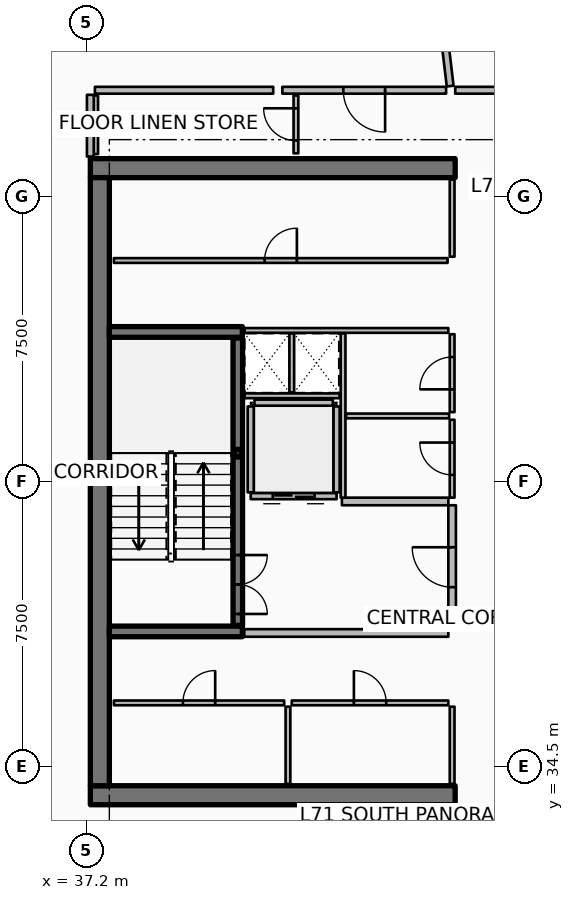
"""IFC4 building model, lengths in metres.
Left out: names, types, materials, properties, quantities, classifications, styles, units other than length and angle.
Written with IfcOpenShell. Run it as: python <this file> out.ifc"""

import sys

from ifc_helpers import new_model, si_unit, direction, frame, frame_2d, origin, origin_2d, place, context, subcontext, project, spatial, rectangle, hollow_rectangle, extrude, element, fill, save


model = new_model("IFC4")
c1 = context("Model", 3, precision=1e-05, world=origin(), true_north=direction((0.0, 1.0)))
c2 = subcontext(c1, "Body", "Model", "MODEL_VIEW")
j1 = project(units=[si_unit("LENGTHUNIT", "METRE"), si_unit("PLANEANGLEUNIT", "RADIAN")], contexts=[c1])
p1 = place(None, origin())
s1 = spatial("IfcSite", under=j1, at=p1, CompositionType="ELEMENT")
p2 = place(p1, origin())
s2 = spatial("IfcBuilding", under=s1, at=p2, CompositionType="ELEMENT")
p3 = place(p2, frame((0.0, 0.0, 282.9)))
s3 = spatial("IfcBuildingStorey", under=s2, at=p3, CompositionType="ELEMENT", Elevation=282.9)
for number, where, z_axis, x_axis in (
    (1, (37.3, 33.75, 0.0), (0.0, 0.0, 1.0), (1.0, 0.0, 0.0)),
    (2, (37.3, 50.25, 0.0), (0.0, 0.0, 1.0), (1.0, 0.0, 0.0)),
):
    element("IfcWall", number, at=place(p3, frame(where, z_axis=z_axis, x_axis=x_axis)), inside=s3, PredefinedType="SHEAR", context=c2, shape_type="SweptSolid", body=[
        extrude(rectangle(XDim=9.6, YDim=0.5, at=frame_2d((4.8, 0.0))), origin(), (0.0, 0.0, 1.0), 3.85),
    ])
p4 = place(p3, frame((37.55, 34.0, 0.0), z_axis=(0.0, 0.0, 1.0), x_axis=(0.0, 1.0, 0.0)))
e3 = element("IfcWall", 3, at=p4, inside=s3, PredefinedType="SHEAR", context=c2, shape_type="SweptSolid", body=[
    extrude(rectangle(XDim=16.0, YDim=0.5, at=frame_2d((8.0, 0.0))), origin(), (0.0, 0.0, 1.0), 3.85),
])
for number, where, z_axis, x_axis in (
    (4, (37.8, 38.06, 0.0), (0.0, 0.0, 1.0), (1.0, 0.0, 0.0)),
    (5, (37.8, 45.94, 0.0), (0.0, 0.0, 1.0), (1.0, 0.0, 0.0)),
):
    element("IfcWall", number, at=place(p3, frame(where, z_axis=z_axis, x_axis=x_axis)), inside=s3, PredefinedType="SHEAR", context=c2, shape_type="SweptSolid", body=[
        extrude(rectangle(XDim=3.5, YDim=0.28, at=frame_2d((1.75, 0.0))), origin(), (0.0, 0.0, 1.0), 3.85),
    ])
p5 = place(p3, frame((41.18, 42.75, 0.0), z_axis=(0.0, 0.0, 1.0), x_axis=(1.0, 0.0, 0.0)))
e6 = element("IfcColumn", 6, at=p5, inside=s3, PredefinedType="COLUMN", context=c2, shape_type="SweptSolid", body=[
    extrude(hollow_rectangle(XDim=0.2, YDim=0.2, WallThickness=0.01, InnerFilletRadius=0.01, OuterFilletRadius=0.02, at=origin_2d()), origin(), (0.0, 0.0, 1.0), 1.72),
])
p6 = place(p3, frame((41.18, 38.22, 0.0), z_axis=(0.0, 0.0, 1.0), x_axis=(0.0, 1.0, 0.0)))
e7 = element("IfcWall", 7, at=p6, inside=s3, PredefinedType="SOLIDWALL", context=c2, shape_type="SweptSolid", body=[
    extrude(rectangle(XDim=7.56, YDim=0.25, at=frame_2d((3.78, 0.0))), origin(), (0.0, 0.0, 1.0), 3.59),
])
p7 = place(p6, frame((0.3, 0.0, 0.0)))
e8 = element("IfcOpeningElement", 8, at=p7, cuts=e7, PredefinedType="OPENING", context=c2, shape_type="SweptSolid", body=[
    extrude(rectangle(XDim=1.55, YDim=2.15, at=frame_2d((0.775, 1.075))), frame((0.0, 0.135, 0.0), z_axis=(0.0, -1.0, 0.0), x_axis=(1.0, 0.0, 0.0)), (0.0, 0.0, 1.0), 0.27),
])
p8 = place(p3, frame((43.78, 41.62, 0.0), z_axis=(0.0, 0.0, 1.0), x_axis=(-1.0, 0.0, 0.0)))
e9 = element("IfcWall", 9, at=p8, inside=s3, PredefinedType="PARTITIONING", context=c2, shape_type="SweptSolid", body=[
    extrude(rectangle(XDim=2.26, YDim=0.16, at=frame_2d((1.13, 0.0))), origin(), (0.0, 0.0, 1.0), 3.59),
])
p9 = place(p8, frame((0.58, 0.0, 0.0)))
e10 = element("IfcOpeningElement", 10, at=p9, cuts=e9, PredefinedType="OPENING", context=c2, shape_type="SweptSolid", body=[
    extrude(rectangle(XDim=1.1, YDim=2.1, at=frame_2d((0.55, 1.05))), frame((0.0, 0.09, 0.0), z_axis=(0.0, -1.0, 0.0), x_axis=(1.0, 0.0, 0.0)), (0.0, 0.0, 1.0), 0.18),
])
for number, where, z_axis, x_axis in (
    (11, (43.78, 41.72, 0.0), (0.0, 0.0, 1.0), (0.0, 1.0, 0.0)),
    (12, (41.52, 41.72, 0.0), (0.0, 0.0, 1.0), (0.0, 1.0, 0.0)),
):
    element("IfcWall", number, at=place(p3, frame(where, z_axis=z_axis, x_axis=x_axis)), inside=s3, PredefinedType="PARTITIONING", context=c2, shape_type="SweptSolid", body=[
        extrude(rectangle(XDim=2.26, YDim=0.16, at=frame_2d((1.13, 0.0))), origin(), (0.0, 0.0, 1.0), 3.59),
    ])
p10 = place(p3, frame((41.62, 44.08, 0.0), z_axis=(0.0, 0.0, 1.0), x_axis=(1.0, 0.0, 0.0)))
e13 = element("IfcWall", 13, at=p10, inside=s3, PredefinedType="PARTITIONING", context=c2, shape_type="SweptSolid", body=[
    extrude(rectangle(XDim=2.06, YDim=0.16, at=frame_2d((1.03, 0.0))), origin(), (0.0, 0.0, 1.0), 3.59),
])
for number, where, z_axis, x_axis in (
    (14, (46.82, 34.05, 0.0), (0.0, 0.0, 1.0), (0.0, 1.0, 0.0)),
    (15, (42.5, 34.05, 0.0), (0.0, 0.0, 1.0), (0.0, 1.0, 0.0)),
):
    element("IfcWall", number, at=place(p3, frame(where, z_axis=z_axis, x_axis=x_axis)), inside=s3, PredefinedType="PARTITIONING", context=c2, shape_type="SweptSolid", body=[
        extrude(rectangle(XDim=2.03, YDim=0.125, at=frame_2d((1.015, 0.0))), origin(), (0.0, 0.0, 1.0), 3.03),
    ])
p11 = place(p3, frame((37.92, 36.18, 0.0), z_axis=(0.0, 0.0, 1.0), x_axis=(1.0, 0.0, 0.0)))
e16 = element("IfcWall", 16, at=p11, inside=s3, PredefinedType="PARTITIONING", context=c2, shape_type="SweptSolid", body=[
    extrude(rectangle(XDim=4.48, YDim=0.125, at=frame_2d((2.24, 0.0))), origin(), (0.0, 0.0, 1.0), 3.03),
])
p12 = place(p11, frame((1.815, 0.0, 0.0)))
e17 = element("IfcOpeningElement", 17, at=p12, cuts=e16, PredefinedType="OPENING", context=c2, shape_type="SweptSolid", body=[
    extrude(rectangle(XDim=0.85, YDim=2.06, at=frame_2d((0.425, 1.03))), frame((0.0, 0.073, 0.0), z_axis=(0.0, -1.0, 0.0), x_axis=(1.0, 0.0, 0.0)), (0.0, 0.0, 1.0), 0.145),
])
p13 = place(p3, frame((42.6, 36.18, 0.0), z_axis=(0.0, 0.0, 1.0), x_axis=(1.0, 0.0, 0.0)))
e18 = element("IfcWall", 18, at=p13, inside=s3, PredefinedType="PARTITIONING", context=c2, shape_type="SweptSolid", body=[
    extrude(rectangle(XDim=4.12, YDim=0.125, at=frame_2d((2.06, 0.0))), origin(), (0.0, 0.0, 1.0), 3.03),
])
p14 = place(p13, frame((1.635, 0.0, 0.0)))
e19 = element("IfcOpeningElement", 19, at=p14, cuts=e18, PredefinedType="OPENING", context=c2, shape_type="SweptSolid", body=[
    extrude(rectangle(XDim=0.85, YDim=2.06, at=frame_2d((0.425, 1.03))), frame((0.0, 0.073, 0.0), z_axis=(0.0, -1.0, 0.0), x_axis=(1.0, 0.0, 0.0)), (0.0, 0.0, 1.0), 0.145),
])
p15 = place(p3, frame((46.82, 47.92, 0.0), z_axis=(0.0, 0.0, 1.0), x_axis=(0.0, 1.0, 0.0)))
e20 = element("IfcWall", 20, at=p15, inside=s3, PredefinedType="PARTITIONING", context=c2, shape_type="SweptSolid", body=[
    extrude(rectangle(XDim=2.03, YDim=0.125, at=frame_2d((1.015, 0.0))), origin(), (0.0, 0.0, 1.0), 3.03),
])
p16 = place(p3, frame((37.92, 47.82, 0.0), z_axis=(0.0, 0.0, 1.0), x_axis=(1.0, 0.0, 0.0)))
e21 = element("IfcWall", 21, at=p16, inside=s3, PredefinedType="PARTITIONING", context=c2, shape_type="SweptSolid", body=[
    extrude(rectangle(XDim=8.78, YDim=0.125, at=frame_2d((4.39, 0.0))), origin(), (0.0, 0.0, 1.0), 3.03),
])
p17 = place(p16, frame((3.965, 0.0, 0.0)))
e22 = element("IfcOpeningElement", 22, at=p17, cuts=e21, PredefinedType="OPENING", context=c2, shape_type="SweptSolid", body=[
    extrude(rectangle(XDim=0.85, YDim=2.06, at=frame_2d((0.425, 1.03))), frame((0.0, 0.073, 0.0), z_axis=(0.0, -1.0, 0.0), x_axis=(1.0, 0.0, 0.0)), (0.0, 0.0, 1.0), 0.145),
])
p18 = place(p3, frame((41.35, 38.02, 0.0), z_axis=(0.0, 0.0, 1.0), x_axis=(1.0, 0.0, 0.0)))
e23 = element("IfcWall", 23, at=p18, inside=s3, PredefinedType="PARTITIONING", context=c2, shape_type="SweptSolid", body=[
    extrude(rectangle(XDim=5.37, YDim=0.2, at=frame_2d((2.685, 0.0))), origin(), (0.0, 0.0, 1.0), 3.59),
])
p19 = place(p3, frame((43.92, 41.48, 0.0), z_axis=(0.0, 0.0, 1.0), x_axis=(1.0, 0.0, 0.0)))
e24 = element("IfcWall", 24, at=p19, inside=s3, PredefinedType="PARTITIONING", context=c2, shape_type="SweptSolid", body=[
    extrude(rectangle(XDim=2.8, YDim=0.2, at=frame_2d((1.4, 0.0))), origin(), (0.0, 0.0, 1.0), 3.59),
])
p20 = place(p3, frame((46.82, 38.12, 0.0), z_axis=(0.0, 0.0, 1.0), x_axis=(0.0, 1.0, 0.0)))
e25 = element("IfcWall", 25, at=p20, inside=s3, PredefinedType="PARTITIONING", context=c2, shape_type="SweptSolid", body=[
    extrude(rectangle(XDim=3.26, YDim=0.2, at=frame_2d((1.63, 0.0))), origin(), (0.0, 0.0, 1.0), 3.59),
])
p21 = place(p20, frame((1.105, 0.0, 0.0)))
e26 = element("IfcOpeningElement", 26, at=p21, cuts=e25, PredefinedType="OPENING", context=c2, shape_type="SweptSolid", body=[
    extrude(rectangle(XDim=1.05, YDim=2.1, at=frame_2d((0.525, 1.05))), frame((0.0, 0.11, 0.0), z_axis=(0.0, -1.0, 0.0), x_axis=(1.0, 0.0, 0.0)), (0.0, 0.0, 1.0), 0.22),
])
p22 = place(p3, frame((41.36, 45.98, 0.0), z_axis=(0.0, 0.0, 1.0), x_axis=(1.0, 0.0, 0.0)))
e27 = element("IfcWall", 27, at=p22, inside=s3, PredefinedType="PARTITIONING", context=c2, shape_type="SweptSolid", body=[
    extrude(rectangle(XDim=5.36, YDim=0.125, at=frame_2d((2.68, 0.0))), origin(), (0.0, 0.0, 1.0), 3.03),
])
p23 = place(p3, frame((41.36, 44.26, 0.0), z_axis=(0.0, 0.0, 1.0), x_axis=(1.0, 0.0, 0.0)))
e28 = element("IfcWall", 28, at=p23, inside=s3, PredefinedType="PARTITIONING", context=c2, shape_type="SweptSolid", body=[
    extrude(rectangle(XDim=2.5, YDim=0.125, at=frame_2d((1.25, 0.0))), origin(), (0.0, 0.0, 1.0), 3.03),
])
p24 = place(p3, frame((42.6, 44.35, 0.0), z_axis=(0.0, 0.0, 1.0), x_axis=(0.0, 1.0, 0.0)))
e29 = element("IfcWall", 29, at=p24, inside=s3, PredefinedType="PARTITIONING", context=c2, shape_type="SweptSolid", body=[
    extrude(rectangle(XDim=1.55, YDim=0.125, at=frame_2d((0.775, 0.0))), origin(), (0.0, 0.0, 1.0), 3.03),
])
p25 = place(p3, frame((43.95, 41.58, 0.0), z_axis=(0.0, 0.0, 1.0), x_axis=(0.0, 1.0, 0.0)))
e30 = element("IfcWall", 30, at=p25, inside=s3, PredefinedType="PARTITIONING", context=c2, shape_type="SweptSolid", body=[
    extrude(rectangle(XDim=4.32, YDim=0.125, at=frame_2d((2.16, 0.0))), origin(), (0.0, 0.0, 1.0), 3.03),
])
p26 = place(p3, frame((44.03, 43.73, 0.0), z_axis=(0.0, 0.0, 1.0), x_axis=(1.0, 0.0, 0.0)))
e31 = element("IfcWall", 31, at=p26, inside=s3, PredefinedType="PARTITIONING", context=c2, shape_type="SweptSolid", body=[
    extrude(rectangle(XDim=2.71, YDim=0.125, at=frame_2d((1.355, 0.0))), origin(), (0.0, 0.0, 1.0), 3.03),
])
p27 = place(p3, frame((46.82, 41.58, 0.0), z_axis=(0.0, 0.0, 1.0), x_axis=(0.0, 1.0, 0.0)))
e32 = element("IfcWall", 32, at=p27, inside=s3, PredefinedType="PARTITIONING", context=c2, shape_type="SweptSolid", body=[
    extrude(rectangle(XDim=2.05, YDim=0.125, at=frame_2d((1.025, 0.0))), origin(), (0.0, 0.0, 1.0), 3.03),
])
p28 = place(p27, frame((0.6, 0.0, 0.0)))
e33 = element("IfcOpeningElement", 33, at=p28, cuts=e32, PredefinedType="OPENING", context=c2, shape_type="SweptSolid", body=[
    extrude(rectangle(XDim=0.85, YDim=2.06, at=frame_2d((0.425, 1.03))), frame((0.0, 0.073, 0.0), z_axis=(0.0, -1.0, 0.0), x_axis=(1.0, 0.0, 0.0)), (0.0, 0.0, 1.0), 0.145),
])
p29 = place(p3, frame((46.82, 43.83, 0.0), z_axis=(0.0, 0.0, 1.0), x_axis=(0.0, 1.0, 0.0)))
e34 = element("IfcWall", 34, at=p29, inside=s3, PredefinedType="PARTITIONING", context=c2, shape_type="SweptSolid", body=[
    extrude(rectangle(XDim=2.05, YDim=0.125, at=frame_2d((1.025, 0.0))), origin(), (0.0, 0.0, 1.0), 3.03),
])
p30 = place(p29, frame((0.6, 0.0, 0.0)))
e35 = element("IfcOpeningElement", 35, at=p30, cuts=e34, PredefinedType="OPENING", context=c2, shape_type="SweptSolid", body=[
    extrude(rectangle(XDim=0.85, YDim=2.06, at=frame_2d((0.425, 1.03))), frame((0.0, 0.073, 0.0), z_axis=(0.0, -1.0, 0.0), x_axis=(1.0, 0.0, 0.0)), (0.0, 0.0, 1.0), 0.145),
])
p31 = place(p3, frame((37.44, 50.62, 0.0), z_axis=(0.0, 0.0, 1.0), x_axis=(0.0, 1.0, 0.0)))
e36 = element("IfcWall", 36, at=p31, inside=s3, PredefinedType="PARTITIONING", context=c2, shape_type="SweptSolid", body=[
    extrude(rectangle(XDim=1.54, YDim=0.125, at=frame_2d((0.77, 0.0))), origin(), (0.0, 0.0, 1.0), 3.03),
])
p32 = place(p3, frame((42.71, 50.64, 0.0), z_axis=(0.0, 0.0, 1.0), x_axis=(0.0, 1.0, 0.0)))
e37 = element("IfcWall", 37, at=p32, inside=s3, PredefinedType="PARTITIONING", context=c2, shape_type="SweptSolid", body=[
    extrude(rectangle(XDim=1.52, YDim=0.125, at=frame_2d((0.76, 0.0))), origin(), (0.0, 0.0, 1.0), 2.957),
])
p33 = place(p32, frame((0.335, 0.0, 0.0)))
e38 = element("IfcOpeningElement", 38, at=p33, cuts=e37, PredefinedType="OPENING", context=c2, shape_type="SweptSolid", body=[
    extrude(rectangle(XDim=0.85, YDim=2.06, at=frame_2d((0.425, 1.03))), frame((0.0, 0.073, 0.0), z_axis=(0.0, -1.0, 0.0), x_axis=(1.0, 0.0, 0.0)), (0.0, 0.0, 1.0), 0.145),
])
p34 = place(p3, frame((46.768, 52.409, 0.0), z_axis=(0.0, 0.0, 1.0), x_axis=(-0.117545848714, 0.993067456646, 0.0)))
e39 = element("IfcWall", 39, at=p34, inside=s3, PredefinedType="PARTITIONING", context=c2, shape_type="SweptSolid", body=[
    extrude(rectangle(XDim=14.213, YDim=0.18, at=frame_2d((7.106, 0.0))), origin(), (0.0, 0.0, 1.0), 2.957),
])
p35 = place(p3, frame((46.661, 52.3, 0.0), z_axis=(0.0, 0.0, 1.0), x_axis=(-1.0, 0.0, 0.0)))
e40 = element("IfcWall", 40, at=p35, inside=s3, PredefinedType="PARTITIONING", context=c2, shape_type="SweptSolid", body=[
    extrude(rectangle(XDim=4.309, YDim=0.18, at=frame_2d((2.155, 0.0))), origin(), (0.0, 0.0, 1.0), 2.957),
])
p36 = place(p35, frame((1.604, 0.0, 0.0)))
e41 = element("IfcOpeningElement", 41, at=p36, cuts=e40, PredefinedType="OPENING", context=c2, shape_type="SweptSolid", body=[
    extrude(rectangle(XDim=1.1, YDim=2.1, at=frame_2d((0.55, 1.05))), frame((0.0, 0.1, 0.0), z_axis=(0.0, -1.0, 0.0), x_axis=(1.0, 0.0, 0.0)), (0.0, 0.0, 1.0), 0.2),
])
p37 = place(p3, frame((42.112, 52.3, 0.0), z_axis=(0.0, 0.0, 1.0), x_axis=(-1.0, 0.0, 0.0)))
e42 = element("IfcWall", 42, at=p37, inside=s3, PredefinedType="PARTITIONING", context=c2, shape_type="SweptSolid", body=[
    extrude(rectangle(XDim=4.692, YDim=0.18, at=frame_2d((2.346, 0.0))), origin(), (0.0, 0.0, 1.0), 2.957),
])
p38 = place(p3, frame((37.3, 52.18, 0.0), z_axis=(0.0, 0.0, 1.0), x_axis=(0.0, -1.0, 0.0)))
e43 = element("IfcWall", 43, at=p38, inside=s3, PredefinedType="PARTITIONING", context=c2, shape_type="SweptSolid", body=[
    extrude(rectangle(XDim=1.625, YDim=0.18, at=frame_2d((0.812, 0.0))), origin(), (0.0, 0.0, 1.0), 2.957),
])
p39 = place(p3, frame((50.785, 52.3, 0.0), z_axis=(0.0, 0.0, 1.0), x_axis=(-1.0, 0.0, 0.0)))
e44 = element("IfcWall", 44, at=p39, inside=s3, PredefinedType="PARTITIONING", context=c2, shape_type="SweptSolid", body=[
    extrude(rectangle(XDim=3.884, YDim=0.18, at=frame_2d((1.942, 0.0))), origin(), (0.0, 0.0, 1.0), 2.957),
])
p40 = place(p39, frame((1.392, 0.0, 0.0)))
e45 = element("IfcOpeningElement", 45, at=p40, cuts=e44, PredefinedType="OPENING", context=c2, shape_type="SweptSolid", body=[
    extrude(rectangle(XDim=1.1, YDim=2.1, at=frame_2d((0.55, 1.05))), frame((0.0, 0.1, 0.0), z_axis=(0.0, -1.0, 0.0), x_axis=(1.0, 0.0, 0.0)), (0.0, 0.0, 1.0), 0.2),
])
p41 = place(p7, origin())
e46 = element("IfcDoor", 46, at=p41, inside=s3, OperationType="DOUBLE_DOOR_SINGLE_SWING", PredefinedType="DOOR", context=c2, shape_type="SweptSolid", body=[
    extrude(rectangle(XDim=1.55, YDim=2.15, at=frame_2d((0.775, 1.075))), frame((0.0, 0.025, 0.0), z_axis=(0.0, -1.0, 0.0), x_axis=(1.0, 0.0, 0.0)), (0.0, 0.0, 1.0), 0.05),
])
fill(e8, e46)
p42 = place(p9, origin())
e47 = element("IfcDoor", 47, at=p42, inside=s3, OperationType="DOUBLE_DOOR_SLIDING", PredefinedType="DOOR", context=c2, shape_type="SweptSolid", body=[
    extrude(rectangle(XDim=1.1, YDim=2.1, at=frame_2d((0.55, 1.05))), frame((0.0, 0.025, 0.0), z_axis=(0.0, -1.0, 0.0), x_axis=(1.0, 0.0, 0.0)), (0.0, 0.0, 1.0), 0.05),
])
fill(e10, e47)
p43 = place(p12, origin())
e48 = element("IfcDoor", 48, at=p43, inside=s3, OperationType="SINGLE_SWING_RIGHT", PredefinedType="DOOR", context=c2, shape_type="SweptSolid", body=[
    extrude(rectangle(XDim=0.85, YDim=2.06, at=frame_2d((0.425, 1.03))), frame((0.0, 0.025, 0.0), z_axis=(0.0, -1.0, 0.0), x_axis=(1.0, 0.0, 0.0)), (0.0, 0.0, 1.0), 0.05),
])
fill(e17, e48)
p44 = place(p14, origin())
e49 = element("IfcDoor", 49, at=p44, inside=s3, OperationType="SINGLE_SWING_LEFT", PredefinedType="DOOR", context=c2, shape_type="SweptSolid", body=[
    extrude(rectangle(XDim=0.85, YDim=2.06, at=frame_2d((0.425, 1.03))), frame((0.0, 0.025, 0.0), z_axis=(0.0, -1.0, 0.0), x_axis=(1.0, 0.0, 0.0)), (0.0, 0.0, 1.0), 0.05),
])
fill(e19, e49)
p45 = place(p17, origin())
e50 = element("IfcDoor", 50, at=p45, inside=s3, OperationType="SINGLE_SWING_RIGHT", PredefinedType="DOOR", context=c2, shape_type="SweptSolid", body=[
    extrude(rectangle(XDim=0.85, YDim=2.06, at=frame_2d((0.425, 1.03))), frame((0.0, 0.025, 0.0), z_axis=(0.0, -1.0, 0.0), x_axis=(1.0, 0.0, 0.0)), (0.0, 0.0, 1.0), 0.05),
])
fill(e22, e50)
p46 = place(p21, origin())
e51 = element("IfcDoor", 51, at=p46, inside=s3, OperationType="SINGLE_SWING_RIGHT", PredefinedType="DOOR", context=c2, shape_type="SweptSolid", body=[
    extrude(rectangle(XDim=1.05, YDim=2.1, at=frame_2d((0.525, 1.05))), frame((0.0, 0.025, 0.0), z_axis=(0.0, -1.0, 0.0), x_axis=(1.0, 0.0, 0.0)), (0.0, 0.0, 1.0), 0.05),
])
fill(e26, e51)
p47 = place(p28, origin())
e52 = element("IfcDoor", 52, at=p47, inside=s3, OperationType="SINGLE_SWING_RIGHT", PredefinedType="DOOR", context=c2, shape_type="SweptSolid", body=[
    extrude(rectangle(XDim=0.85, YDim=2.06, at=frame_2d((0.425, 1.03))), frame((0.0, 0.025, 0.0), z_axis=(0.0, -1.0, 0.0), x_axis=(1.0, 0.0, 0.0)), (0.0, 0.0, 1.0), 0.05),
])
fill(e33, e52)
p48 = place(p30, origin())
e53 = element("IfcDoor", 53, at=p48, inside=s3, OperationType="SINGLE_SWING_LEFT", PredefinedType="DOOR", context=c2, shape_type="SweptSolid", body=[
    extrude(rectangle(XDim=0.85, YDim=2.06, at=frame_2d((0.425, 1.03))), frame((0.0, 0.025, 0.0), z_axis=(0.0, -1.0, 0.0), x_axis=(1.0, 0.0, 0.0)), (0.0, 0.0, 1.0), 0.05),
])
fill(e35, e53)
p49 = place(p33, origin())
e54 = element("IfcDoor", 54, at=p49, inside=s3, OperationType="SINGLE_SWING_RIGHT", PredefinedType="DOOR", context=c2, shape_type="SweptSolid", body=[
    extrude(rectangle(XDim=0.85, YDim=2.06, at=frame_2d((0.425, 1.03))), frame((0.0, 0.025, 0.0), z_axis=(0.0, -1.0, 0.0), x_axis=(1.0, 0.0, 0.0)), (0.0, 0.0, 1.0), 0.05),
])
fill(e38, e54)
p50 = place(p36, origin())
e55 = element("IfcDoor", 55, at=p50, inside=s3, OperationType="SINGLE_SWING_LEFT", PredefinedType="DOOR", context=c2, shape_type="SweptSolid", body=[
    extrude(rectangle(XDim=1.1, YDim=2.1, at=frame_2d((0.55, 1.05))), frame((0.0, 0.025, 0.0), z_axis=(0.0, -1.0, 0.0), x_axis=(1.0, 0.0, 0.0)), (0.0, 0.0, 1.0), 0.05),
])
fill(e41, e55)
save(model, sys.argv[1])
